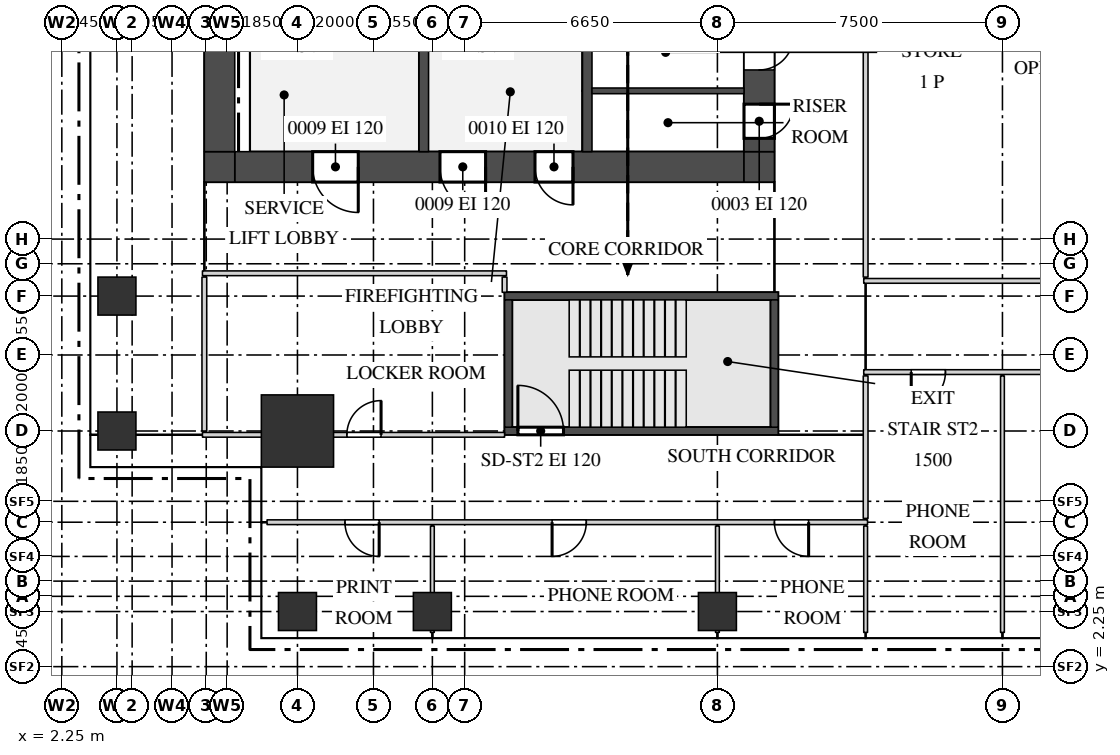
"""IFC4 building model, lengths in metres.
Left out: names, types, materials, properties, quantities, classifications, styles, units other than length and angle.
Written with IfcOpenShell. Run it as: python <this file> out.ifc"""

import sys

from ifc_helpers import new_model, si_unit, direction, frame, frame_2d, origin, origin_2d, place, context, subcontext, project, spatial, rectangle, extrude, source, transform, mapped, element, fill, save


model = new_model("IFC4")
c1 = context("Model", 3, precision=1e-05, world=origin(), true_north=direction((0.0, 1.0)))
c2 = subcontext(c1, "Body", "Model", "MODEL_VIEW")
j1 = project(units=[si_unit("LENGTHUNIT", "METRE"), si_unit("PLANEANGLEUNIT", "RADIAN")], contexts=[c1])
p1 = place(None, origin())
s1 = spatial("IfcSite", under=j1, at=p1, CompositionType="ELEMENT")
p2 = place(p1, origin())
s2 = spatial("IfcBuilding", under=s1, at=p2, CompositionType="ELEMENT")
p3 = place(p2, frame((0.0, 0.0, 188.7)))
s3 = spatial("IfcBuildingStorey", under=s2, at=p3, CompositionType="ELEMENT", Elevation=188.7)
m1 = source(origin(), c2, "Body", "SweptSolid", [
    extrude(rectangle(XDim=13.4, YDim=0.8, at=frame_2d((6.7, 0.0))), origin(), (0.0, 0.0, 1.0), 3.75),
])
p4 = place(p3, frame((6.8, 15.4, 0.0), z_axis=(0.0, 0.0, 1.0), x_axis=(1.0, 0.0, 0.0)))
e1 = element("IfcWall", 1, at=p4, inside=s3, PredefinedType="SHEAR", context=c2, shape_type="MappedRepresentation", body=[
    mapped(m1, transform((0.0, 0.0, 0.0))),
])
m2 = source(origin(), c2, "Body", "SweptSolid", [
    extrude(rectangle(XDim=1.2, YDim=2.1, at=frame_2d((0.6, 1.05))), frame((0.0, 0.41, 0.0), z_axis=(0.0, -1.0, 0.0), x_axis=(1.0, 0.0, 0.0)), (0.0, 0.0, 1.0), 0.82),
])
p5 = place(p4, frame((5.4, 0.0, 0.0)))
e2 = element("IfcOpeningElement", 2, at=p5, cuts=e1, PredefinedType="OPENING", context=c2, shape_type="MappedRepresentation", body=[
    mapped(m2, transform((0.0, 0.0, 0.0))),
])
p6 = place(p4, frame((2.05, 0.0, 0.0)))
e3 = element("IfcOpeningElement", 3, at=p6, cuts=e1, PredefinedType="OPENING", context=c2, shape_type="MappedRepresentation", body=[
    mapped(m2, transform((0.0, 0.0, 0.0))),
])
m3 = source(origin(), c2, "Body", "SweptSolid", [
    extrude(rectangle(XDim=1.0, YDim=2.1, at=frame_2d((0.5, 1.05))), frame((0.0, 0.41, 0.0), z_axis=(0.0, -1.0, 0.0), x_axis=(1.0, 0.0, 0.0)), (0.0, 0.0, 1.0), 0.82),
])
p7 = place(p4, frame((7.9, 0.0, 0.0)))
e4 = element("IfcOpeningElement", 4, at=p7, cuts=e1, PredefinedType="OPENING", context=c2, shape_type="MappedRepresentation", body=[
    mapped(m3, transform((0.0, 0.0, 0.0))),
])
m4 = source(origin(), c2, "Body", "SweptSolid", [
    extrude(rectangle(XDim=0.8, YDim=0.8, at=frame_2d((0.4, 0.0))), origin(), (0.0, 0.0, 1.0), 3.75),
])
for number, where, z_axis, x_axis in (
    (5, (20.2, 15.4, 0.0), (0.0, 0.0, 1.0), (1.0, 0.0, 0.0)),
    (6, (6.0, 15.4, 0.0), (0.0, 0.0, 1.0), (1.0, 0.0, 0.0)),
):
    element("IfcWall", number, at=place(p3, frame(where, z_axis=z_axis, x_axis=x_axis)), inside=s3, PredefinedType="SHEAR", context=c2, shape_type="MappedRepresentation", body=[
        mapped(m4, transform((0.0, 0.0, 0.0))),
    ])
m5 = source(origin(), c2, "Body", "SweptSolid", [
    extrude(rectangle(XDim=22.4, YDim=0.8, at=frame_2d((11.2, 0.0))), origin(), (0.0, 0.0, 1.0), 3.75),
])
p8 = place(p3, frame((20.6, 15.8, 0.0), z_axis=(0.0, 0.0, 1.0), x_axis=(0.0, 1.0, 0.0)))
e7 = element("IfcWall", 7, at=p8, inside=s3, PredefinedType="SHEAR", context=c2, shape_type="MappedRepresentation", body=[
    mapped(m5, transform((0.0, 0.0, 0.0))),
])
m6 = source(origin(), c2, "Body", "SweptSolid", [
    extrude(rectangle(XDim=1.8, YDim=2.1, at=frame_2d((0.9, 1.05))), frame((0.0, 0.41, 0.0), z_axis=(0.0, -1.0, 0.0), x_axis=(1.0, 0.0, 0.0)), (0.0, 0.0, 1.0), 0.82),
])
p9 = place(p8, frame((10.7, 0.0, 0.0)))
e8 = element("IfcOpeningElement", 8, at=p9, cuts=e7, PredefinedType="OPENING", context=c2, shape_type="MappedRepresentation", body=[
    mapped(m6, transform((0.0, 0.0, 0.0))),
])
m7 = source(origin(), c2, "Body", "SweptSolid", [
    extrude(rectangle(XDim=0.9, YDim=2.1, at=frame_2d((0.45, 1.05))), frame((0.0, 0.41, 0.0), z_axis=(0.0, -1.0, 0.0), x_axis=(1.0, 0.0, 0.0)), (0.0, 0.0, 1.0), 0.82),
])
p10 = place(p8, frame((0.35, 0.0, 0.0)))
e9 = element("IfcOpeningElement", 9, at=p10, cuts=e7, PredefinedType="OPENING", context=c2, shape_type="MappedRepresentation", body=[
    mapped(m7, transform((0.0, 0.0, 0.0))),
])
p11 = place(p8, frame((2.15, 0.0, 0.0)))
e10 = element("IfcOpeningElement", 10, at=p11, cuts=e7, PredefinedType="OPENING", context=c2, shape_type="MappedRepresentation", body=[
    mapped(m7, transform((0.0, 0.0, 0.0))),
])
p12 = place(p8, frame((4.85, 0.0, 0.0)))
e11 = element("IfcOpeningElement", 11, at=p12, cuts=e7, PredefinedType="OPENING", context=c2, shape_type="MappedRepresentation", body=[
    mapped(m3, transform((0.0, 0.0, 0.0))),
])
p13 = place(p3, frame((6.4, 15.8, 0.0), z_axis=(0.0, 0.0, 1.0), x_axis=(0.0, 1.0, 0.0)))
e12 = element("IfcWall", 12, at=p13, inside=s3, PredefinedType="SHEAR", context=c2, shape_type="MappedRepresentation", body=[
    mapped(m5, transform((0.0, 0.0, 0.0))),
])
m8 = source(origin(), c2, "Body", "SweptSolid", [
    extrude(rectangle(XDim=7.2, YDim=0.2, at=frame_2d((3.6, 0.0))), origin(), (0.0, 0.0, 1.0), 3.75),
])
p14 = place(p3, frame((13.9, 12.0, 0.0), z_axis=(0.0, 0.0, 1.0), x_axis=(1.0, 0.0, 0.0)))
e13 = element("IfcWall", 13, at=p14, inside=s3, PredefinedType="SHEAR", context=c2, shape_type="MappedRepresentation", body=[
    mapped(m8, transform((0.0, 0.0, 0.0))),
])
p15 = place(p3, frame((13.9, 8.45, 0.0), z_axis=(0.0, 0.0, 1.0), x_axis=(1.0, 0.0, 0.0)))
e14 = element("IfcWall", 14, at=p15, inside=s3, PredefinedType="SHEAR", context=c2, shape_type="MappedRepresentation", body=[
    mapped(m8, transform((0.0, 0.0, 0.0))),
])
m9 = source(origin(), c2, "Body", "SweptSolid", [
    extrude(rectangle(XDim=1.2, YDim=2.1, at=frame_2d((0.6, 1.05))), frame((0.0, 0.11, 0.0), z_axis=(0.0, -1.0, 0.0), x_axis=(1.0, 0.0, 0.0)), (0.0, 0.0, 1.0), 0.22),
])
p16 = place(p15, frame((0.35, 0.0, 0.0)))
e15 = element("IfcOpeningElement", 15, at=p16, cuts=e14, PredefinedType="OPENING", context=c2, shape_type="MappedRepresentation", body=[
    mapped(m9, transform((0.0, 0.0, 0.0))),
])
m10 = source(origin(), c2, "Body", "SweptSolid", [
    extrude(rectangle(XDim=3.35, YDim=0.2, at=frame_2d((1.675, 0.0))), origin(), (0.0, 0.0, 1.0), 3.75),
])
for number, where, z_axis, x_axis in (
    (16, (21.0, 8.55, 0.0), (0.0, 0.0, 1.0), (0.0, 1.0, 0.0)),
    (17, (14.0, 8.55, 0.0), (0.0, 0.0, 1.0), (0.0, 1.0, 0.0)),
):
    element("IfcWall", number, at=place(p3, frame(where, z_axis=z_axis, x_axis=x_axis)), inside=s3, PredefinedType="SHEAR", context=c2, shape_type="MappedRepresentation", body=[
        mapped(m10, transform((0.0, 0.0, 0.0))),
    ])
m11 = source(origin(), c2, "Body", "SweptSolid", [
    extrude(rectangle(XDim=3.4, YDim=0.25, at=frame_2d((1.7, 0.0))), origin(), (0.0, 0.0, 1.0), 3.75),
])
for number, where, z_axis, x_axis in (
    (18, (16.075, 15.8, 0.0), (0.0, 0.0, 1.0), (0.0, 1.0, 0.0)),
    (19, (11.775, 15.8, 0.0), (0.0, 0.0, 1.0), (0.0, 1.0, 0.0)),
):
    element("IfcWall", number, at=place(p3, frame(where, z_axis=z_axis, x_axis=x_axis)), inside=s3, PredefinedType="STANDARD", context=c2, shape_type="MappedRepresentation", body=[
        mapped(m11, transform((0.0, 0.0, 0.0))),
    ])
m12 = source(origin(), c2, "Body", "SweptSolid", [
    extrude(rectangle(XDim=1.9, YDim=1.9, at=origin_2d()), origin(), (0.0, 0.0, 1.0), 4.0),
])
p17 = place(p3, frame((8.45, 8.45, 0.0), z_axis=(0.0, 0.0, 1.0), x_axis=(1.0, 0.0, 0.0)))
e20 = element("IfcColumn", 20, at=p17, inside=s3, PredefinedType="COLUMN", context=c2, shape_type="MappedRepresentation", body=[
    mapped(m12, transform((0.0, 0.0, 0.0))),
])
m13 = source(origin(), c2, "Body", "SweptSolid", [
    extrude(rectangle(XDim=1.0, YDim=1.0, at=origin_2d()), origin(), (0.0, 0.0, 1.0), 3.75),
])
for number, where, z_axis, x_axis in (
    (21, (8.45, 3.7, 0.0), (0.0, 0.0, 1.0), (1.0, 0.0, 0.0)),
    (22, (12.0, 3.7, 0.0), (0.0, 0.0, 1.0), (1.0, 0.0, 0.0)),
    (23, (19.5, 3.7, 0.0), (0.0, 0.0, 1.0), (1.0, 0.0, 0.0)),
    (24, (3.7, 8.45, 0.0), (0.0, 0.0, 1.0), (1.0, 0.0, 0.0)),
    (25, (3.7, 12.0, 0.0), (0.0, 0.0, 1.0), (1.0, 0.0, 0.0)),
):
    element("IfcColumn", number, at=place(p3, frame(where, z_axis=z_axis, x_axis=x_axis)), inside=s3, PredefinedType="COLUMN", context=c2, shape_type="MappedRepresentation", body=[
        mapped(m13, transform((0.0, 0.0, 0.0))),
    ])
m14 = source(origin(), c2, "Body", "SweptSolid", [
    extrude(rectangle(XDim=2.8, YDim=0.1, at=frame_2d((1.4, 0.0))), origin(), (0.0, 0.0, 1.0), 3.3),
])
p18 = place(p3, frame((12.0, 3.15, 0.0), z_axis=(0.0, 0.0, 1.0), x_axis=(0.0, 1.0, 0.0)))
e26 = element("IfcWall", 26, at=p18, inside=s3, PredefinedType="PARTITIONING", context=c2, shape_type="MappedRepresentation", body=[
    mapped(m14, transform((0.0, 0.0, 0.0))),
])
m15 = source(origin(), c2, "Body", "SweptSolid", [
    extrude(rectangle(XDim=2.8, YDim=0.1, at=frame_2d((1.4, 0.0))), origin(), (0.0, 0.0, 1.0), 3.42),
])
p19 = place(p3, frame((19.5, 3.15, 0.0), z_axis=(0.0, 0.0, 1.0), x_axis=(0.0, 1.0, 0.0)))
e27 = element("IfcWall", 27, at=p19, inside=s3, PredefinedType="PARTITIONING", context=c2, shape_type="MappedRepresentation", body=[
    mapped(m15, transform((0.0, 0.0, 0.0))),
])
m16 = source(origin(), c2, "Body", "SweptSolid", [
    extrude(rectangle(XDim=2.8, YDim=0.1, at=frame_2d((1.4, 0.0))), origin(), (0.0, 0.0, 1.0), 3.8),
])
p20 = place(p3, frame((23.4, 3.15, 0.0), z_axis=(0.0, 0.0, 1.0), x_axis=(0.0, 1.0, 0.0)))
e28 = element("IfcWall", 28, at=p20, inside=s3, PredefinedType="PARTITIONING", context=c2, shape_type="MappedRepresentation", body=[
    mapped(m16, transform((0.0, 0.0, 0.0))),
])
m17 = source(origin(), c2, "Body", "SweptSolid", [
    extrude(rectangle(XDim=6.75, YDim=0.1, at=frame_2d((3.375, 0.0))), origin(), (0.0, 0.0, 1.0), 3.3),
])
p21 = place(p3, frame((27.0, 3.15, 0.0), z_axis=(0.0, 0.0, 1.0), x_axis=(0.0, 1.0, 0.0)))
e29 = element("IfcWall", 29, at=p21, inside=s3, PredefinedType="PARTITIONING", context=c2, shape_type="MappedRepresentation", body=[
    mapped(m17, transform((0.0, 0.0, 0.0))),
])
m18 = source(origin(), c2, "Body", "SweptSolid", [
    extrude(rectangle(XDim=15.8, YDim=0.125, at=frame_2d((7.9, 0.0))), origin(), (0.0, 0.0, 1.0), 3.8),
])
p22 = place(p3, frame((7.65, 6.05, 0.0), z_axis=(0.0, 0.0, 1.0), x_axis=(1.0, 0.0, 0.0)))
e30 = element("IfcWall", 30, at=p22, inside=s3, PredefinedType="PARTITIONING", context=c2, shape_type="MappedRepresentation", body=[
    mapped(m18, transform((0.0, 0.0, 0.0))),
])
m19 = source(origin(), c2, "Body", "SweptSolid", [
    extrude(rectangle(XDim=0.9, YDim=2.1, at=frame_2d((0.45, 1.05))), frame((0.0, 0.073, 0.0), z_axis=(0.0, -1.0, 0.0), x_axis=(1.0, 0.0, 0.0)), (0.0, 0.0, 1.0), 0.145),
])
p23 = place(p22, frame((2.05, 0.0, 0.0)))
e31 = element("IfcOpeningElement", 31, at=p23, cuts=e30, PredefinedType="OPENING", context=c2, shape_type="MappedRepresentation", body=[
    mapped(m19, transform((0.0, 0.0, 0.0))),
])
p24 = place(p22, frame((7.5, 0.0, 0.0)))
e32 = element("IfcOpeningElement", 32, at=p24, cuts=e30, PredefinedType="OPENING", context=c2, shape_type="MappedRepresentation", body=[
    mapped(m19, transform((0.0, 0.0, 0.0))),
])
p25 = place(p22, frame((13.35, 0.0, 0.0)))
e33 = element("IfcOpeningElement", 33, at=p25, cuts=e30, PredefinedType="OPENING", context=c2, shape_type="MappedRepresentation", body=[
    mapped(m19, transform((0.0, 0.0, 0.0))),
])
m20 = source(origin(), c2, "Body", "SweptSolid", [
    extrude(rectangle(XDim=3.75, YDim=0.125, at=frame_2d((1.875, 0.0))), origin(), (0.0, 0.0, 1.0), 3.8),
])
p26 = place(p3, frame((23.4, 6.15, 0.0), z_axis=(0.0, 0.0, 1.0), x_axis=(0.0, 1.0, 0.0)))
e34 = element("IfcWall", 34, at=p26, inside=s3, PredefinedType="PARTITIONING", context=c2, shape_type="MappedRepresentation", body=[
    mapped(m20, transform((0.0, 0.0, 0.0))),
])
m21 = source(origin(), c2, "Body", "SweptSolid", [
    extrude(rectangle(XDim=7.95, YDim=0.125, at=frame_2d((3.975, 0.0))), origin(), (0.0, 0.0, 1.0), 3.25),
])
p27 = place(p3, frame((5.95, 8.35, 0.0), z_axis=(0.0, 0.0, 1.0), x_axis=(1.0, 0.0, 0.0)))
e35 = element("IfcWall", 35, at=p27, inside=s3, PredefinedType="PARTITIONING", context=c2, shape_type="MappedRepresentation", body=[
    mapped(m21, transform((0.0, 0.0, 0.0))),
])
p28 = place(p27, frame((3.8, 0.0, 0.0)))
e36 = element("IfcOpeningElement", 36, at=p28, cuts=e35, PredefinedType="OPENING", context=c2, shape_type="MappedRepresentation", body=[
    mapped(m19, transform((0.0, 0.0, 0.0))),
])
m22 = source(origin(), c2, "Body", "SweptSolid", [
    extrude(rectangle(XDim=4.05, YDim=0.125, at=frame_2d((2.025, 0.0))), origin(), (0.0, 0.0, 1.0), 3.8),
])
p29 = place(p3, frame((6.0, 8.45, 0.0), z_axis=(0.0, 0.0, 1.0), x_axis=(0.0, 1.0, 0.0)))
e37 = element("IfcWall", 37, at=p29, inside=s3, PredefinedType="PARTITIONING", context=c2, shape_type="MappedRepresentation", body=[
    mapped(m22, transform((0.0, 0.0, 0.0))),
])
m23 = source(origin(), c2, "Body", "SweptSolid", [
    extrude(rectangle(XDim=20.6, YDim=0.125, at=frame_2d((10.3, 0.0))), origin(), (0.0, 0.0, 1.0), 3.8),
])
p30 = place(p3, frame((23.35, 10.0, 0.0), z_axis=(0.0, 0.0, 1.0), x_axis=(1.0, 0.0, 0.0)))
e38 = element("IfcWall", 38, at=p30, inside=s3, PredefinedType="PARTITIONING", context=c2, shape_type="MappedRepresentation", body=[
    mapped(m23, transform((0.0, 0.0, 0.0))),
])
p31 = place(p30, frame((1.25, 0.0, 0.0)))
e39 = element("IfcOpeningElement", 39, at=p31, cuts=e38, PredefinedType="OPENING", context=c2, shape_type="MappedRepresentation", body=[
    mapped(m19, transform((0.0, 0.0, 0.0))),
])
m24 = source(origin(), c2, "Body", "SweptSolid", [
    extrude(rectangle(XDim=1.2, YDim=2.1, at=frame_2d((0.6, 1.05))), frame((0.0, 0.073, 0.0), z_axis=(0.0, -1.0, 0.0), x_axis=(1.0, 0.0, 0.0)), (0.0, 0.0, 1.0), 0.145),
])
p32 = place(p30, frame((10.55, 0.0, 0.0)))
e40 = element("IfcOpeningElement", 40, at=p32, cuts=e38, PredefinedType="OPENING", context=c2, shape_type="MappedRepresentation", body=[
    mapped(m24, transform((0.0, 0.0, 0.0))),
])
p33 = place(p30, frame((19.05, 0.0, 0.0)))
e41 = element("IfcOpeningElement", 41, at=p33, cuts=e38, PredefinedType="OPENING", context=c2, shape_type="MappedRepresentation", body=[
    mapped(m24, transform((0.0, 0.0, 0.0))),
])
m25 = source(origin(), c2, "Body", "SweptSolid", [
    extrude(rectangle(XDim=0.4, YDim=0.125, at=frame_2d((0.2, 0.0))), origin(), (0.0, 0.0, 1.0), 3.8),
])
p34 = place(p3, frame((13.9, 12.1, 0.0), z_axis=(0.0, 0.0, 1.0), x_axis=(0.0, 1.0, 0.0)))
e42 = element("IfcWall", 42, at=p34, inside=s3, PredefinedType="PARTITIONING", context=c2, shape_type="MappedRepresentation", body=[
    mapped(m25, transform((0.0, 0.0, 0.0))),
])
m26 = source(origin(), c2, "Body", "SweptSolid", [
    extrude(rectangle(XDim=18.3, YDim=0.125, at=frame_2d((9.15, 0.0))), origin(), (0.0, 0.0, 1.0), 3.8),
])
p35 = place(p3, frame((23.35, 12.4, 0.0), z_axis=(0.0, 0.0, 1.0), x_axis=(1.0, 0.0, 0.0)))
e43 = element("IfcWall", 43, at=p35, inside=s3, PredefinedType="PARTITIONING", context=c2, shape_type="MappedRepresentation", body=[
    mapped(m26, transform((0.0, 0.0, 0.0))),
])
m27 = source(origin(), c2, "Body", "SweptSolid", [
    extrude(rectangle(XDim=23.4, YDim=0.125, at=frame_2d((11.7, 0.0))), origin(), (0.0, 0.0, 1.0), 3.8),
])
p36 = place(p3, frame((23.4, 12.5, 0.0), z_axis=(0.0, 0.0, 1.0), x_axis=(0.0, 1.0, 0.0)))
e44 = element("IfcWall", 44, at=p36, inside=s3, PredefinedType="PARTITIONING", context=c2, shape_type="MappedRepresentation", body=[
    mapped(m27, transform((0.0, 0.0, 0.0))),
])
p37 = place(p36, frame((6.6, 0.0, 0.0)))
e45 = element("IfcOpeningElement", 45, at=p37, cuts=e44, PredefinedType="OPENING", context=c2, shape_type="MappedRepresentation", body=[
    mapped(m24, transform((0.0, 0.0, 0.0))),
])
m28 = source(origin(), c2, "Body", "SweptSolid", [
    extrude(rectangle(XDim=8.0, YDim=0.125, at=frame_2d((4.0, 0.0))), origin(), (0.0, 0.0, 1.0), 3.8),
])
p38 = place(p3, frame((5.95, 12.6, 0.0), z_axis=(0.0, 0.0, 1.0), x_axis=(1.0, 0.0, 0.0)))
e46 = element("IfcWall", 46, at=p38, inside=s3, PredefinedType="PARTITIONING", context=c2, shape_type="MappedRepresentation", body=[
    mapped(m28, transform((0.0, 0.0, 0.0))),
])
m29 = source(origin(), c2, "Body", "SweptSolid", [
    extrude(rectangle(XDim=4.0, YDim=0.15, at=frame_2d((2.0, 0.0))), origin(), (0.0, 0.0, 1.0), 3.8),
])
p39 = place(p3, frame((16.2, 17.4, 0.0), z_axis=(0.0, 0.0, 1.0), x_axis=(1.0, 0.0, 0.0)))
e47 = element("IfcWall", 47, at=p39, inside=s3, PredefinedType="PARTITIONING", context=c2, shape_type="MappedRepresentation", body=[
    mapped(m29, transform((0.0, 0.0, 0.0))),
])
m30 = source(origin(), c2, "Body", "SweptSolid", [
    extrude(rectangle(XDim=0.9, YDim=2.1, at=frame_2d((0.45, 1.05))), frame((0.0, 0.35, 0.0), z_axis=(0.0, -1.0, 0.0), x_axis=(1.0, 0.0, 0.0)), (0.0, 0.0, 1.0), 0.7),
])
p40 = place(p10, origin())
e48 = element("IfcDoor", 48, at=p40, inside=s3, OperationType="SINGLE_SWING_RIGHT", PredefinedType="DOOR", context=c2, shape_type="MappedRepresentation", body=[
    mapped(m30, transform((0.0, 0.0, 0.0))),
])
fill(e9, e48)
p41 = place(p11, origin())
e49 = element("IfcDoor", 49, at=p41, inside=s3, OperationType="SINGLE_SWING_RIGHT", PredefinedType="DOOR", context=c2, shape_type="MappedRepresentation", body=[
    mapped(m30, transform((0.0, 0.0, 0.0))),
])
fill(e10, e49)
m31 = source(origin(), c2, "Body", "SweptSolid", [
    extrude(rectangle(XDim=1.2, YDim=2.1, at=frame_2d((0.6, 1.05))), frame((0.0, 0.35, 0.0), z_axis=(0.0, -1.0, 0.0), x_axis=(1.0, 0.0, 0.0)), (0.0, 0.0, 1.0), 0.7),
])
p42 = place(p5, origin())
e50 = element("IfcDoor", 50, at=p42, inside=s3, OperationType="SINGLE_SWING_RIGHT", PredefinedType="DOOR", context=c2, shape_type="MappedRepresentation", body=[
    mapped(m31, transform((0.0, 0.0, 0.0))),
])
fill(e2, e50)
p43 = place(p6, origin())
e51 = element("IfcDoor", 51, at=p43, inside=s3, OperationType="SINGLE_SWING_RIGHT", PredefinedType="DOOR", context=c2, shape_type="MappedRepresentation", body=[
    mapped(m31, transform((0.0, 0.0, 0.0))),
])
fill(e3, e51)
m32 = source(origin(), c2, "Body", "SweptSolid", [
    extrude(rectangle(XDim=1.0, YDim=2.1, at=frame_2d((0.5, 1.05))), frame((0.0, 0.35, 0.0), z_axis=(0.0, -1.0, 0.0), x_axis=(1.0, 0.0, 0.0)), (0.0, 0.0, 1.0), 0.7),
])
p44 = place(p7, origin())
e52 = element("IfcDoor", 52, at=p44, inside=s3, OperationType="SINGLE_SWING_RIGHT", PredefinedType="DOOR", context=c2, shape_type="MappedRepresentation", body=[
    mapped(m32, transform((0.0, 0.0, 0.0))),
])
fill(e4, e52)
m33 = source(origin(), c2, "Body", "SweptSolid", [
    extrude(rectangle(XDim=0.9, YDim=2.1, at=frame_2d((0.45, 1.05))), frame((0.0, 0.025, 0.0), z_axis=(0.0, -1.0, 0.0), x_axis=(1.0, 0.0, 0.0)), (0.0, 0.0, 1.0), 0.05),
])
p45 = place(p31, origin())
e53 = element("IfcDoor", 53, at=p45, inside=s3, OperationType="SINGLE_SWING_LEFT", PredefinedType="DOOR", context=c2, shape_type="MappedRepresentation", body=[
    mapped(m33, transform((0.0, 0.0, 0.0))),
])
fill(e39, e53)
p46 = place(p28, origin())
e54 = element("IfcDoor", 54, at=p46, inside=s3, OperationType="SINGLE_SWING_LEFT", PredefinedType="DOOR", context=c2, shape_type="MappedRepresentation", body=[
    mapped(m33, transform((0.0, 0.0, 0.0))),
])
fill(e36, e54)
p47 = place(p23, origin())
e55 = element("IfcDoor", 55, at=p47, inside=s3, OperationType="SINGLE_SWING_RIGHT", PredefinedType="DOOR", context=c2, shape_type="MappedRepresentation", body=[
    mapped(m33, transform((0.0, 0.0, 0.0))),
])
fill(e31, e55)
p48 = place(p24, origin())
e56 = element("IfcDoor", 56, at=p48, inside=s3, OperationType="SINGLE_SWING_LEFT", PredefinedType="DOOR", context=c2, shape_type="MappedRepresentation", body=[
    mapped(m33, transform((0.0, 0.0, 0.0))),
])
fill(e32, e56)
p49 = place(p25, origin())
e57 = element("IfcDoor", 57, at=p49, inside=s3, OperationType="SINGLE_SWING_RIGHT", PredefinedType="DOOR", context=c2, shape_type="MappedRepresentation", body=[
    mapped(m33, transform((0.0, 0.0, 0.0))),
])
fill(e33, e57)
m34 = source(origin(), c2, "Body", "SweptSolid", [
    extrude(rectangle(XDim=1.2, YDim=2.1, at=frame_2d((0.6, 1.05))), frame((0.0, 0.025, 0.0), z_axis=(0.0, -1.0, 0.0), x_axis=(1.0, 0.0, 0.0)), (0.0, 0.0, 1.0), 0.05),
])
p50 = place(p16, origin())
e58 = element("IfcDoor", 58, at=p50, inside=s3, OperationType="SINGLE_SWING_RIGHT", PredefinedType="DOOR", context=c2, shape_type="MappedRepresentation", body=[
    mapped(m34, transform((0.0, 0.0, 0.0))),
])
fill(e15, e58)
save(model, sys.argv[1])
